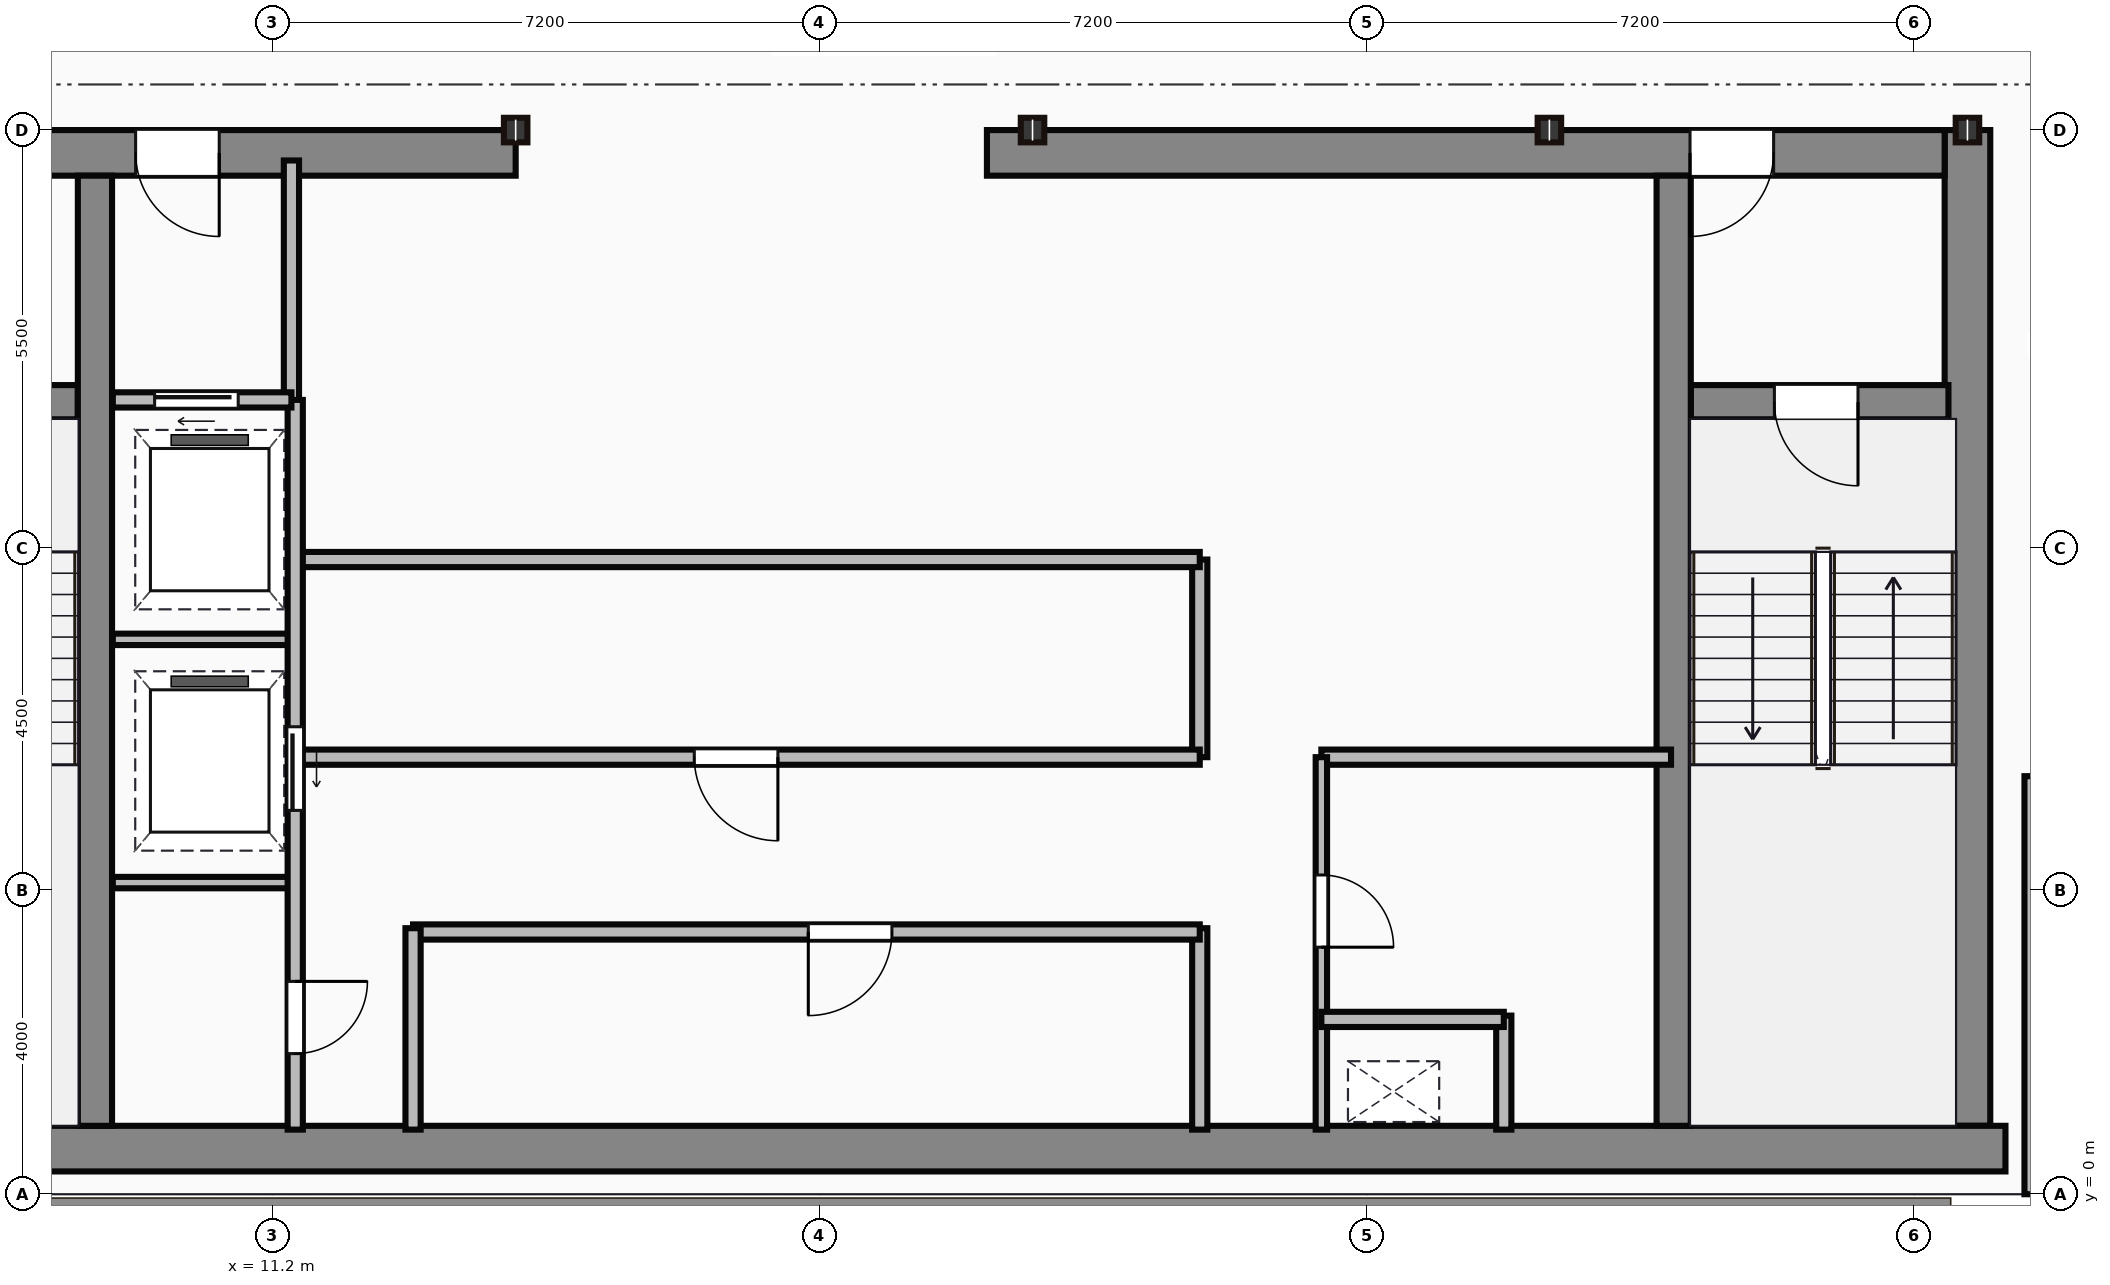
"""IFC4 building model, lengths in metres.
Left out: names, types, materials, properties, quantities, classifications, styles, units other than length and angle.
Written with IfcOpenShell. Run it as: python <this file> out.ifc"""

import sys

from ifc_helpers import new_model, si_unit, direction, frame, frame_2d, origin, origin_2d, place, context, subcontext, project, spatial, rectangle, i_section, extrude, source, transform, mapped, element, fill, save


model = new_model("IFC4")
c1 = context("Model", 3, precision=1e-05, world=origin(), true_north=direction((0.0, 1.0)))
c2 = subcontext(c1, "Body", "Model", "MODEL_VIEW")
j1 = project(units=[si_unit("LENGTHUNIT", "METRE"), si_unit("PLANEANGLEUNIT", "RADIAN")], contexts=[c1])
p1 = place(None, origin())
s1 = spatial("IfcSite", under=j1, at=p1, CompositionType="ELEMENT")
p2 = place(p1, origin())
s2 = spatial("IfcBuilding", under=s1, at=p2, CompositionType="ELEMENT")
p3 = place(p2, frame((0.0, 0.0, 296.05)))
s3 = spatial("IfcBuildingStorey", under=s2, at=p3, CompositionType="ELEMENT", Elevation=296.05)
m1 = source(origin(), c2, "Body", "SweptSolid", [
    extrude(rectangle(XDim=29.5, YDim=0.6, at=frame_2d((14.75, 0.0))), origin(), (0.0, 0.0, 1.0), 3.8),
])
p4 = place(p3, frame((4.5, 0.6, 0.0), z_axis=(0.0, 0.0, 1.0), x_axis=(1.0, 0.0, 0.0)))
e1 = element("IfcWall", 1, at=p4, inside=s3, PredefinedType="SHEAR", context=c2, shape_type="MappedRepresentation", body=[
    mapped(m1, transform((0.0, 0.0, 0.0))),
])
m2 = source(origin(), c2, "Body", "SweptSolid", [
    extrude(rectangle(XDim=13.1, YDim=0.6, at=frame_2d((6.55, 0.0))), origin(), (0.0, 0.0, 1.0), 3.8),
])
p5 = place(p3, frame((33.5, 0.9, 0.0), z_axis=(0.0, 0.0, 1.0), x_axis=(0.0, 1.0, 0.0)))
e2 = element("IfcWall", 2, at=p5, inside=s3, PredefinedType="SHEAR", context=c2, shape_type="MappedRepresentation", body=[
    mapped(m2, transform((0.0, 0.0, 0.0))),
])
m3 = source(origin(), c2, "Body", "SweptSolid", [
    extrude(rectangle(XDim=9.1, YDim=0.6, at=frame_2d((4.55, 0.0))), origin(), (0.0, 0.0, 1.0), 3.8),
])
p6 = place(p3, frame((5.3, 13.7, 0.0), z_axis=(0.0, 0.0, 1.0), x_axis=(1.0, 0.0, 0.0)))
e3 = element("IfcWall", 3, at=p6, inside=s3, PredefinedType="SHEAR", context=c2, shape_type="MappedRepresentation", body=[
    mapped(m3, transform((0.0, 0.0, 0.0))),
])
p7 = place(p6, frame((4.1, 0.0, 0.0)))
e4 = element("IfcOpeningElement", 4, at=p7, cuts=e3, PredefinedType="OPENING", context=c2, shape_type="SweptSolid", body=[
    extrude(rectangle(XDim=1.1, YDim=2.15, at=frame_2d((0.55, 1.075))), frame((0.0, 0.31, 0.0), z_axis=(0.0, -1.0, 0.0), x_axis=(1.0, 0.0, 0.0)), (0.0, 0.0, 1.0), 0.62),
])
m4 = source(origin(), c2, "Body", "SweptSolid", [
    extrude(rectangle(XDim=12.6, YDim=0.6, at=frame_2d((6.3, 0.0))), origin(), (0.0, 0.0, 1.0), 3.8),
])
p8 = place(p3, frame((20.6, 13.7, 0.0), z_axis=(0.0, 0.0, 1.0), x_axis=(1.0, 0.0, 0.0)))
e5 = element("IfcWall", 5, at=p8, inside=s3, PredefinedType="SHEAR", context=c2, shape_type="MappedRepresentation", body=[
    mapped(m4, transform((0.0, 0.0, 0.0))),
])
p9 = place(p8, frame((9.25, 0.0, 0.0)))
e6 = element("IfcOpeningElement", 6, at=p9, cuts=e5, PredefinedType="OPENING", context=c2, shape_type="SweptSolid", body=[
    extrude(rectangle(XDim=1.1, YDim=2.15, at=frame_2d((0.55, 1.075))), frame((0.0, 0.31, 0.0), z_axis=(0.0, -1.0, 0.0), x_axis=(1.0, 0.0, 0.0)), (0.0, 0.0, 1.0), 0.62),
])
m5 = source(origin(), c2, "Body", "SweptSolid", [
    extrude(rectangle(XDim=12.5, YDim=0.45, at=frame_2d((6.25, 0.0))), origin(), (0.0, 0.0, 1.0), 3.8),
])
for number, where, z_axis, x_axis in (
    (7, (8.865, 0.9, 0.0), (0.0, 0.0, 1.0), (0.0, 1.0, 0.0)),
    (8, (29.635, 0.9, 0.0), (0.0, 0.0, 1.0), (0.0, 1.0, 0.0)),
):
    element("IfcWall", number, at=place(p3, frame(where, z_axis=z_axis, x_axis=x_axis)), inside=s3, PredefinedType="SHEAR", context=c2, shape_type="MappedRepresentation", body=[
        mapped(m5, transform((0.0, 0.0, 0.0))),
    ])
m6 = source(origin(), c2, "Body", "SweptSolid", [
    extrude(rectangle(XDim=3.39, YDim=0.45, at=frame_2d((1.695, 0.0))), origin(), (0.0, 0.0, 1.0), 3.8),
])
p10 = place(p3, frame((5.25, 10.42, 0.0), z_axis=(0.0, 0.0, 1.0), x_axis=(1.0, 0.0, 0.0)))
e9 = element("IfcWall", 9, at=p10, inside=s3, PredefinedType="SHEAR", context=c2, shape_type="MappedRepresentation", body=[
    mapped(m6, transform((0.0, 0.0, 0.0))),
])
p11 = place(p10, frame((1.05, 0.0, 0.0)))
e10 = element("IfcOpeningElement", 10, at=p11, cuts=e9, PredefinedType="OPENING", context=c2, shape_type="SweptSolid", body=[
    extrude(rectangle(XDim=1.1, YDim=2.15, at=frame_2d((0.55, 1.075))), frame((0.0, 0.235, 0.0), z_axis=(0.0, -1.0, 0.0), x_axis=(1.0, 0.0, 0.0)), (0.0, 0.0, 1.0), 0.47),
])
p12 = place(p3, frame((29.86, 10.42, 0.0), z_axis=(0.0, 0.0, 1.0), x_axis=(1.0, 0.0, 0.0)))
e11 = element("IfcWall", 11, at=p12, inside=s3, PredefinedType="SHEAR", context=c2, shape_type="MappedRepresentation", body=[
    mapped(m6, transform((0.0, 0.0, 0.0))),
])
p13 = place(p12, frame((1.1, 0.0, 0.0)))
e12 = element("IfcOpeningElement", 12, at=p13, cuts=e11, PredefinedType="OPENING", context=c2, shape_type="SweptSolid", body=[
    extrude(rectangle(XDim=1.1, YDim=2.15, at=frame_2d((0.55, 1.075))), frame((0.0, 0.235, 0.0), z_axis=(0.0, -1.0, 0.0), x_axis=(1.0, 0.0, 0.0)), (0.0, 0.0, 1.0), 0.47),
])
m7 = source(origin(), c2, "Body", "SweptSolid", [
    extrude(i_section(OverallWidth=0.309, OverallDepth=0.323, WebThickness=0.014, FlangeThickness=0.023, at=origin_2d()), origin(), (0.0, 0.0, 1.0), 3.8),
])
for number, where, z_axis, x_axis in (
    (13, (14.4, 14.0, 0.0), (0.0, 0.0, 1.0), (1.0, 0.0, 0.0)),
    (14, (21.2, 14.0, 0.0), (0.0, 0.0, 1.0), (1.0, 0.0, 0.0)),
    (15, (28.0, 14.0, 0.0), (0.0, 0.0, 1.0), (1.0, 0.0, 0.0)),
    (16, (33.5, 14.0, 0.0), (0.0, 0.0, 1.0), (1.0, 0.0, 0.0)),
):
    element("IfcColumn", number, at=place(p3, frame(where, z_axis=z_axis, x_axis=x_axis)), inside=s3, PredefinedType="COLUMN", context=c2, shape_type="MappedRepresentation", body=[
        mapped(m7, transform((0.0, 0.0, 0.0))),
    ])
m8 = source(origin(), c2, "Body", "SweptSolid", [
    extrude(rectangle(XDim=5.5, YDim=0.25, at=frame_2d((2.75, 0.0))), origin(), (0.0, 0.0, 1.0), 3.5),
])
p14 = place(p3, frame((34.375, 0.0, 0.0), z_axis=(0.0, 0.0, 1.0), x_axis=(0.0, 1.0, 0.0)))
e17 = element("IfcWall", 17, at=p14, inside=s3, PredefinedType="STANDARD", context=c2, shape_type="MappedRepresentation", body=[
    mapped(m8, transform((0.0, 0.0, 0.0))),
])
m9 = source(origin(), c2, "Body", "SweptSolid", [
    extrude(rectangle(XDim=3.18, YDim=0.2, at=frame_2d((1.59, 0.0))), origin(), (0.0, 0.0, 1.0), 3.5),
])
p15 = place(p3, frame((11.45, 10.42, 0.0), z_axis=(0.0, 0.0, 1.0), x_axis=(0.0, 1.0, 0.0)))
e18 = element("IfcWall", 18, at=p15, inside=s3, PredefinedType="PARTITIONING", context=c2, shape_type="MappedRepresentation", body=[
    mapped(m9, transform((0.0, 0.0, 0.0))),
])
m10 = source(origin(), c2, "Body", "SweptSolid", [
    extrude(rectangle(XDim=2.35, YDim=0.2, at=frame_2d((1.175, 0.0))), origin(), (0.0, 0.0, 1.0), 3.5),
])
p16 = place(p3, frame((9.1, 10.45, 0.0), z_axis=(0.0, 0.0, 1.0), x_axis=(1.0, 0.0, 0.0)))
e19 = element("IfcWall", 19, at=p16, inside=s3, PredefinedType="PARTITIONING", context=c2, shape_type="MappedRepresentation", body=[
    mapped(m10, transform((0.0, 0.0, 0.0))),
])
p17 = place(p16, frame((0.55, 0.0, 0.0)))
e20 = element("IfcOpeningElement", 20, at=p17, cuts=e19, PredefinedType="OPENING", context=c2, shape_type="SweptSolid", body=[
    extrude(rectangle(XDim=1.1, YDim=2.15, at=frame_2d((0.55, 1.075))), frame((0.0, 0.11, 0.0), z_axis=(0.0, -1.0, 0.0), x_axis=(1.0, 0.0, 0.0)), (0.0, 0.0, 1.0), 0.22),
])
m11 = source(origin(), c2, "Body", "SweptSolid", [
    extrude(rectangle(XDim=9.6, YDim=0.2, at=frame_2d((4.8, 0.0))), origin(), (0.0, 0.0, 1.0), 3.5),
])
p18 = place(p3, frame((11.5, 0.85, 0.0), z_axis=(0.0, 0.0, 1.0), x_axis=(0.0, 1.0, 0.0)))
e21 = element("IfcWall", 21, at=p18, inside=s3, PredefinedType="PARTITIONING", context=c2, shape_type="MappedRepresentation", body=[
    mapped(m11, transform((0.0, 0.0, 0.0))),
])
p19 = place(p18, frame((4.2, 0.0, 0.0)))
e22 = element("IfcOpeningElement", 22, at=p19, cuts=e21, PredefinedType="OPENING", context=c2, shape_type="SweptSolid", body=[
    extrude(rectangle(XDim=1.1, YDim=2.15, at=frame_2d((0.55, 1.075))), frame((0.0, 0.11, 0.0), z_axis=(0.0, -1.0, 0.0), x_axis=(1.0, 0.0, 0.0)), (0.0, 0.0, 1.0), 0.22),
])
p20 = place(p18, frame((1.0, 0.0, 0.0)))
e23 = element("IfcOpeningElement", 23, at=p20, cuts=e21, PredefinedType="OPENING", context=c2, shape_type="SweptSolid", body=[
    extrude(rectangle(XDim=0.95, YDim=2.15, at=frame_2d((0.475, 1.075))), frame((0.0, 0.11, 0.0), z_axis=(0.0, -1.0, 0.0), x_axis=(1.0, 0.0, 0.0)), (0.0, 0.0, 1.0), 0.22),
])
m12 = source(origin(), c2, "Body", "SweptSolid", [
    extrude(rectangle(XDim=2.4, YDim=0.15, at=frame_2d((1.2, 0.0))), origin(), (0.0, 0.0, 1.0), 3.5),
])
for number, where, z_axis, x_axis in (
    (24, (9.1, 4.1, 0.0), (0.0, 0.0, 1.0), (1.0, 0.0, 0.0)),
    (25, (9.1, 7.3, 0.0), (0.0, 0.0, 1.0), (1.0, 0.0, 0.0)),
):
    element("IfcWall", number, at=place(p3, frame(where, z_axis=z_axis, x_axis=x_axis)), inside=s3, PredefinedType="PARTITIONING", context=c2, shape_type="MappedRepresentation", body=[
        mapped(m12, transform((0.0, 0.0, 0.0))),
    ])
m13 = source(origin(), c2, "Body", "SweptSolid", [
    extrude(rectangle(XDim=2.65, YDim=0.2, at=frame_2d((1.325, 0.0))), origin(), (0.0, 0.0, 1.0), 3.5),
])
p21 = place(p3, frame((13.05, 0.85, 0.0), z_axis=(0.0, 0.0, 1.0), x_axis=(0.0, 1.0, 0.0)))
e26 = element("IfcWall", 26, at=p21, inside=s3, PredefinedType="PARTITIONING", context=c2, shape_type="MappedRepresentation", body=[
    mapped(m13, transform((0.0, 0.0, 0.0))),
])
m14 = source(origin(), c2, "Body", "SweptSolid", [
    extrude(rectangle(XDim=10.35, YDim=0.2, at=frame_2d((5.175, 0.0))), origin(), (0.0, 0.0, 1.0), 3.5),
])
p22 = place(p3, frame((13.05, 3.45, 0.0), z_axis=(0.0, 0.0, 1.0), x_axis=(1.0, 0.0, 0.0)))
e27 = element("IfcWall", 27, at=p22, inside=s3, PredefinedType="PARTITIONING", context=c2, shape_type="MappedRepresentation", body=[
    mapped(m14, transform((0.0, 0.0, 0.0))),
])
p23 = place(p22, frame((5.2, 0.0, 0.0)))
e28 = element("IfcOpeningElement", 28, at=p23, cuts=e27, PredefinedType="OPENING", context=c2, shape_type="SweptSolid", body=[
    extrude(rectangle(XDim=1.1, YDim=2.15, at=frame_2d((0.55, 1.075))), frame((0.0, 0.11, 0.0), z_axis=(0.0, -1.0, 0.0), x_axis=(1.0, 0.0, 0.0)), (0.0, 0.0, 1.0), 0.22),
])
p24 = place(p3, frame((23.4, 0.85, 0.0), z_axis=(0.0, 0.0, 1.0), x_axis=(0.0, 1.0, 0.0)))
e29 = element("IfcWall", 29, at=p24, inside=s3, PredefinedType="PARTITIONING", context=c2, shape_type="MappedRepresentation", body=[
    mapped(m13, transform((0.0, 0.0, 0.0))),
])
m15 = source(origin(), c2, "Body", "SweptSolid", [
    extrude(rectangle(XDim=11.85, YDim=0.2, at=frame_2d((5.925, 0.0))), origin(), (0.0, 0.0, 1.0), 3.5),
])
p25 = place(p3, frame((11.55, 5.75, 0.0), z_axis=(0.0, 0.0, 1.0), x_axis=(1.0, 0.0, 0.0)))
e30 = element("IfcWall", 30, at=p25, inside=s3, PredefinedType="PARTITIONING", context=c2, shape_type="MappedRepresentation", body=[
    mapped(m15, transform((0.0, 0.0, 0.0))),
])
p26 = place(p25, frame((5.2, 0.0, 0.0)))
e31 = element("IfcOpeningElement", 31, at=p26, cuts=e30, PredefinedType="OPENING", context=c2, shape_type="SweptSolid", body=[
    extrude(rectangle(XDim=1.1, YDim=2.15, at=frame_2d((0.55, 1.075))), frame((0.0, 0.11, 0.0), z_axis=(0.0, -1.0, 0.0), x_axis=(1.0, 0.0, 0.0)), (0.0, 0.0, 1.0), 0.22),
])
p27 = place(p3, frame((11.55, 8.35, 0.0), z_axis=(0.0, 0.0, 1.0), x_axis=(1.0, 0.0, 0.0)))
e32 = element("IfcWall", 32, at=p27, inside=s3, PredefinedType="PARTITIONING", context=c2, shape_type="MappedRepresentation", body=[
    mapped(m15, transform((0.0, 0.0, 0.0))),
])
m16 = source(origin(), c2, "Body", "SweptSolid", [
    extrude(rectangle(XDim=2.6, YDim=0.2, at=frame_2d((1.3, 0.0))), origin(), (0.0, 0.0, 1.0), 3.5),
])
p28 = place(p3, frame((23.4, 5.75, 0.0), z_axis=(0.0, 0.0, 1.0), x_axis=(0.0, 1.0, 0.0)))
e33 = element("IfcWall", 33, at=p28, inside=s3, PredefinedType="PARTITIONING", context=c2, shape_type="MappedRepresentation", body=[
    mapped(m16, transform((0.0, 0.0, 0.0))),
])
m17 = source(origin(), c2, "Body", "SweptSolid", [
    extrude(rectangle(XDim=4.9, YDim=0.15, at=frame_2d((2.45, 0.0))), origin(), (0.0, 0.0, 1.0), 3.5),
])
p29 = place(p3, frame((25.0, 0.85, 0.0), z_axis=(0.0, 0.0, 1.0), x_axis=(0.0, 1.0, 0.0)))
e34 = element("IfcWall", 34, at=p29, inside=s3, PredefinedType="PARTITIONING", context=c2, shape_type="MappedRepresentation", body=[
    mapped(m17, transform((0.0, 0.0, 0.0))),
])
p30 = place(p29, frame((2.4, 0.0, 0.0)))
e35 = element("IfcOpeningElement", 35, at=p30, cuts=e34, PredefinedType="OPENING", context=c2, shape_type="SweptSolid", body=[
    extrude(rectangle(XDim=0.95, YDim=2.15, at=frame_2d((0.475, 1.075))), frame((0.0, 0.085, 0.0), z_axis=(0.0, -1.0, 0.0), x_axis=(1.0, 0.0, 0.0)), (0.0, 0.0, 1.0), 0.17),
])
m18 = source(origin(), c2, "Body", "SweptSolid", [
    extrude(rectangle(XDim=4.6, YDim=0.2, at=frame_2d((2.3, 0.0))), origin(), (0.0, 0.0, 1.0), 3.5),
])
p31 = place(p3, frame((25.0, 5.75, 0.0), z_axis=(0.0, 0.0, 1.0), x_axis=(1.0, 0.0, 0.0)))
e36 = element("IfcWall", 36, at=p31, inside=s3, PredefinedType="PARTITIONING", context=c2, shape_type="MappedRepresentation", body=[
    mapped(m18, transform((0.0, 0.0, 0.0))),
])
m19 = source(origin(), c2, "Body", "SweptSolid", [
    extrude(rectangle(XDim=2.4, YDim=0.2, at=frame_2d((1.2, 0.0))), origin(), (0.0, 0.0, 1.0), 3.5),
])
p32 = place(p3, frame((25.0, 2.3, 0.0), z_axis=(0.0, 0.0, 1.0), x_axis=(1.0, 0.0, 0.0)))
e37 = element("IfcWall", 37, at=p32, inside=s3, PredefinedType="PARTITIONING", context=c2, shape_type="MappedRepresentation", body=[
    mapped(m19, transform((0.0, 0.0, 0.0))),
])
m20 = source(origin(), c2, "Body", "SweptSolid", [
    extrude(rectangle(XDim=1.5, YDim=0.2, at=frame_2d((0.75, 0.0))), origin(), (0.0, 0.0, 1.0), 3.5),
])
p33 = place(p3, frame((27.4, 0.85, 0.0), z_axis=(0.0, 0.0, 1.0), x_axis=(0.0, 1.0, 0.0)))
e38 = element("IfcWall", 38, at=p33, inside=s3, PredefinedType="PARTITIONING", context=c2, shape_type="MappedRepresentation", body=[
    mapped(m20, transform((0.0, 0.0, 0.0))),
])
m21 = source(origin(), c2, "Body", "SweptSolid", [
    extrude(rectangle(XDim=1.1, YDim=2.15, at=frame_2d((0.55, 1.075))), frame((0.0, 0.025, 0.0), z_axis=(0.0, -1.0, 0.0), x_axis=(1.0, 0.0, 0.0)), (0.0, 0.0, 1.0), 0.05),
])
p34 = place(p13, frame((1.1, 0.0, 0.0), z_axis=(0.0, 0.0, 1.0), x_axis=(-1.0, 0.0, 0.0)))
e39 = element("IfcDoor", 39, at=p34, inside=s3, OperationType="SINGLE_SWING_RIGHT", PredefinedType="DOOR", context=c2, shape_type="MappedRepresentation", body=[
    mapped(m21, transform((0.0, 0.0, 0.0))),
])
fill(e12, e39)
p35 = place(p7, origin())
e40 = element("IfcDoor", 40, at=p35, inside=s3, OperationType="SINGLE_SWING_RIGHT", PredefinedType="DOOR", context=c2, shape_type="MappedRepresentation", body=[
    mapped(m21, transform((0.0, 0.0, 0.0))),
])
fill(e4, e40)
p36 = place(p9, origin())
e41 = element("IfcDoor", 41, at=p36, inside=s3, OperationType="SINGLE_SWING_LEFT", PredefinedType="DOOR", context=c2, shape_type="MappedRepresentation", body=[
    mapped(m21, transform((0.0, 0.0, 0.0))),
])
fill(e6, e41)
p37 = place(p17, origin())
e42 = element("IfcDoor", 42, at=p37, inside=s3, OperationType="SLIDING_TO_LEFT", PredefinedType="DOOR", context=c2, shape_type="MappedRepresentation", body=[
    mapped(m21, transform((0.0, 0.0, 0.0))),
])
fill(e20, e42)
p38 = place(p19, frame((1.1, 0.0, 0.0), z_axis=(0.0, 0.0, 1.0), x_axis=(-1.0, 0.0, 0.0)))
e43 = element("IfcDoor", 43, at=p38, inside=s3, OperationType="SLIDING_TO_LEFT", PredefinedType="DOOR", context=c2, shape_type="MappedRepresentation", body=[
    mapped(m21, transform((0.0, 0.0, 0.0))),
])
fill(e22, e43)
m22 = source(origin(), c2, "Body", "SweptSolid", [
    extrude(rectangle(XDim=0.95, YDim=2.15, at=frame_2d((0.475, 1.075))), frame((0.0, 0.025, 0.0), z_axis=(0.0, -1.0, 0.0), x_axis=(1.0, 0.0, 0.0)), (0.0, 0.0, 1.0), 0.05),
])
p39 = place(p20, frame((0.95, 0.0, 0.0), z_axis=(0.0, 0.0, 1.0), x_axis=(-1.0, 0.0, 0.0)))
e44 = element("IfcDoor", 44, at=p39, inside=s3, OperationType="SINGLE_SWING_RIGHT", PredefinedType="DOOR", context=c2, shape_type="MappedRepresentation", body=[
    mapped(m22, transform((0.0, 0.0, 0.0))),
])
fill(e23, e44)
p40 = place(p23, origin())
e45 = element("IfcDoor", 45, at=p40, inside=s3, OperationType="SINGLE_SWING_LEFT", PredefinedType="DOOR", context=c2, shape_type="MappedRepresentation", body=[
    mapped(m21, transform((0.0, 0.0, 0.0))),
])
fill(e28, e45)
p41 = place(p26, frame((1.1, 0.0, 0.0), z_axis=(0.0, 0.0, 1.0), x_axis=(-1.0, 0.0, 0.0)))
e46 = element("IfcDoor", 46, at=p41, inside=s3, OperationType="SINGLE_SWING_RIGHT", PredefinedType="DOOR", context=c2, shape_type="MappedRepresentation", body=[
    mapped(m21, transform((0.0, 0.0, 0.0))),
])
fill(e31, e46)
p42 = place(p30, origin())
e47 = element("IfcDoor", 47, at=p42, inside=s3, OperationType="SINGLE_SWING_LEFT", PredefinedType="DOOR", context=c2, shape_type="MappedRepresentation", body=[
    mapped(m22, transform((0.0, 0.0, 0.0))),
])
fill(e35, e47)
save(model, sys.argv[1])
